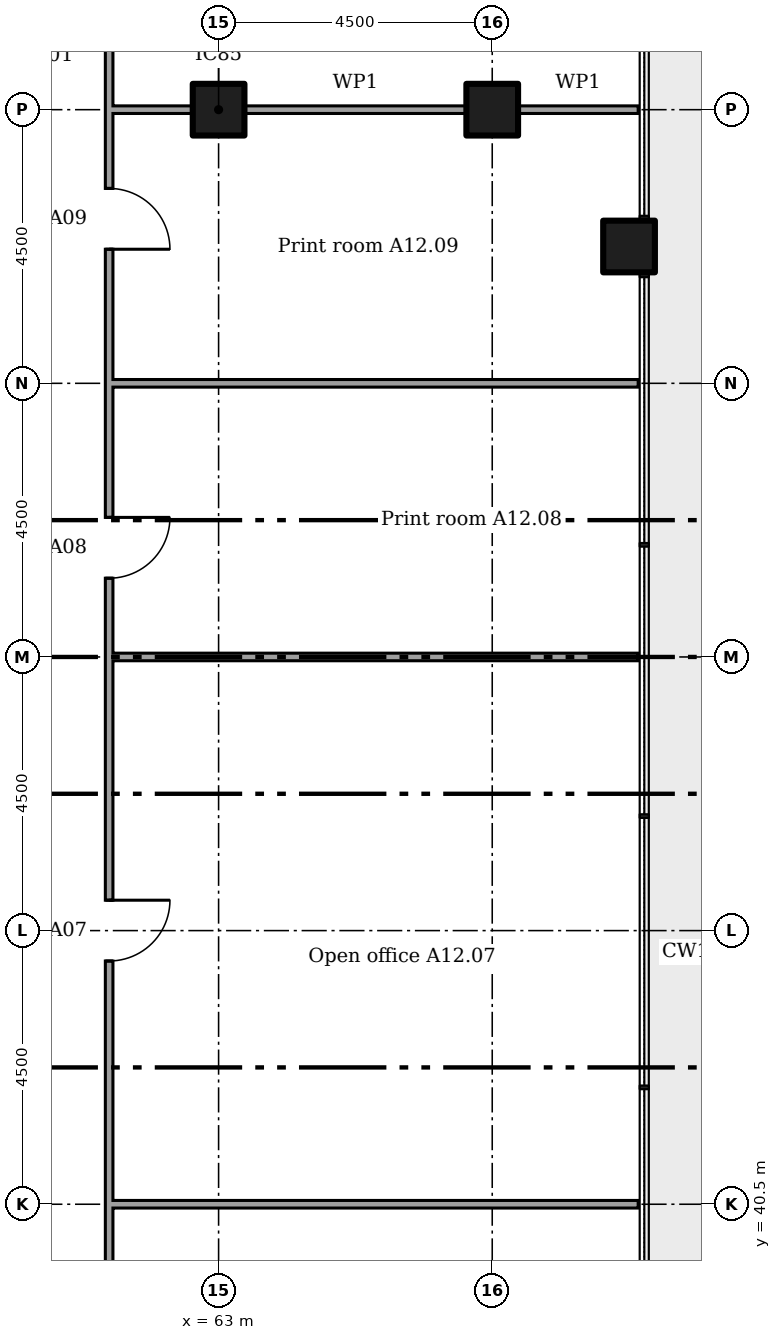
"""IFC4 building model, lengths in metres.
Left out: names, types, materials, properties, quantities, classifications, styles, units other than length and angle.
Written with IfcOpenShell. Run it as: python <this file> out.ifc"""

import sys

from ifc_helpers import new_model, si_unit, direction, frame, frame_2d, origin, origin_2d, place, context, subcontext, project, spatial, rectangle, extrude, element, fill, save


model = new_model("IFC4")
c1 = context("Model", 3, precision=1e-05, world=origin(), true_north=direction((0.0, 1.0)))
c2 = subcontext(c1, "Body", "Model", "MODEL_VIEW")
j1 = project(units=[si_unit("LENGTHUNIT", "METRE"), si_unit("PLANEANGLEUNIT", "RADIAN")], contexts=[c1])
p1 = place(None, origin())
s1 = spatial("IfcSite", under=j1, at=p1, CompositionType="ELEMENT")
p2 = place(p1, origin())
s2 = spatial("IfcBuilding", under=s1, at=p2, CompositionType="ELEMENT")
p3 = place(p2, frame((0.0, 0.0, 54.6)))
s3 = spatial("IfcBuildingStorey", under=s2, at=p3, CompositionType="ELEMENT", Elevation=54.6)
for number, where in (
    (1, (63.0, 58.5, 0.0)),
    (2, (67.5, 58.5, 0.0)),
    (3, (69.75, 56.25, 0.0)),
):
    element("IfcColumn", number, at=place(p3, frame(where)), inside=s3, PredefinedType="COLUMN", context=c2, shape_type="SweptSolid", body=[
        extrude(rectangle(XDim=0.85, YDim=0.85, at=origin_2d()), origin(), (0.0, 0.0, 1.0), 3.6),
    ])
for number, where in (
    (4, (61.2, 40.5, 0.0)),
    (5, (61.2, 49.5, 0.0)),
    (6, (61.2, 54.0, 0.0)),
):
    element("IfcWall", number, at=place(p3, frame(where)), inside=s3, PredefinedType="PARTITIONING", context=c2, shape_type="SweptSolid", body=[
        extrude(rectangle(XDim=8.7, YDim=0.125, at=frame_2d((4.35, 0.0))), origin(), (0.0, 0.0, 1.0), 2.766),
    ])
p4 = place(p3, frame((61.2, 58.5, 0.0)))
e7 = element("IfcWall", 7, at=p4, inside=s3, PredefinedType="PARTITIONING", context=c2, shape_type="SweptSolid", body=[
    extrude(rectangle(XDim=1.375, YDim=0.125, at=frame_2d((0.688, 0.0))), origin(), (0.0, 0.0, 1.0), 2.676),
])
p5 = place(p3, frame((63.425, 58.5, 0.0)))
e8 = element("IfcWall", 8, at=p5, inside=s3, PredefinedType="PARTITIONING", context=c2, shape_type="SweptSolid", body=[
    extrude(rectangle(XDim=3.65, YDim=0.125, at=frame_2d((1.825, 0.0))), origin(), (0.0, 0.0, 1.0), 2.676),
])
p6 = place(p3, frame((67.925, 58.5, 0.0)))
e9 = element("IfcWall", 9, at=p6, inside=s3, PredefinedType="PARTITIONING", context=c2, shape_type="SweptSolid", body=[
    extrude(rectangle(XDim=1.975, YDim=0.125, at=frame_2d((0.987, 0.0))), origin(), (0.0, 0.0, 1.0), 2.676),
])
p7 = place(p3, frame((61.2, 38.462, 0.0), z_axis=(0.0, 0.0, 1.0), x_axis=(0.0, 1.0, 0.0)))
e10 = element("IfcWall", 10, at=p7, inside=s3, PredefinedType="PARTITIONING", context=c2, shape_type="SweptSolid", body=[
    extrude(rectangle(XDim=22.075, YDim=0.125, at=frame_2d((11.038, 0.0))), origin(), (0.0, 0.0, 1.0), 3.45),
])
p8 = place(p7, frame((6.038, 0.0, 0.0)))
e11 = element("IfcOpeningElement", 11, at=p8, cuts=e10, PredefinedType="OPENING", context=c2, shape_type="SweptSolid", body=[
    extrude(rectangle(XDim=1.0, YDim=2.1, at=frame_2d((0.5, 1.05))), frame((0.0, 0.073, 0.0), z_axis=(0.0, -1.0, 0.0), x_axis=(1.0, 0.0, 0.0)), (0.0, 0.0, 1.0), 0.145),
])
p9 = place(p7, frame((12.333, 0.0, 0.0)))
e12 = element("IfcOpeningElement", 12, at=p9, cuts=e10, PredefinedType="OPENING", context=c2, shape_type="SweptSolid", body=[
    extrude(rectangle(XDim=1.0, YDim=2.1, at=frame_2d((0.5, 1.05))), frame((0.0, 0.073, 0.0), z_axis=(0.0, -1.0, 0.0), x_axis=(1.0, 0.0, 0.0)), (0.0, 0.0, 1.0), 0.145),
])
p10 = place(p7, frame((17.742, 0.0, 0.0)))
e13 = element("IfcOpeningElement", 13, at=p10, cuts=e10, PredefinedType="OPENING", context=c2, shape_type="SweptSolid", body=[
    extrude(rectangle(XDim=1.0, YDim=2.1, at=frame_2d((0.5, 1.05))), frame((0.0, 0.073, 0.0), z_axis=(0.0, -1.0, 0.0), x_axis=(1.0, 0.0, 0.0)), (0.0, 0.0, 1.0), 0.145),
])
p11 = place(p8, frame((1.0, 0.0, 0.0), x_axis=(-1.0, 0.0, 0.0)))
e14 = element("IfcDoor", 14, at=p11, inside=s3, OperationType="SINGLE_SWING_RIGHT", PredefinedType="DOOR", context=c2, shape_type="SweptSolid", body=[
    extrude(rectangle(XDim=1.0, YDim=2.1, at=frame_2d((0.5, 1.05))), frame((0.0, 0.025, 0.0), z_axis=(0.0, -1.0, 0.0), x_axis=(1.0, 0.0, 0.0)), (0.0, 0.0, 1.0), 0.05),
])
fill(e11, e14)
p12 = place(p9, frame((1.0, 0.0, 0.0), x_axis=(-1.0, 0.0, 0.0)))
e15 = element("IfcDoor", 15, at=p12, inside=s3, OperationType="SINGLE_SWING_RIGHT", PredefinedType="DOOR", context=c2, shape_type="SweptSolid", body=[
    extrude(rectangle(XDim=1.0, YDim=2.1, at=frame_2d((0.5, 1.05))), frame((0.0, 0.025, 0.0), z_axis=(0.0, -1.0, 0.0), x_axis=(1.0, 0.0, 0.0)), (0.0, 0.0, 1.0), 0.05),
])
fill(e12, e15)
p13 = place(p10, frame((1.0, 0.0, 0.0), x_axis=(-1.0, 0.0, 0.0)))
e16 = element("IfcDoor", 16, at=p13, inside=s3, OperationType="SINGLE_SWING_LEFT", PredefinedType="DOOR", context=c2, shape_type="SweptSolid", body=[
    extrude(rectangle(XDim=1.0, YDim=2.1, at=frame_2d((0.5, 1.05))), frame((0.0, 0.025, 0.0), z_axis=(0.0, -1.0, 0.0), x_axis=(1.0, 0.0, 0.0)), (0.0, 0.0, 1.0), 0.05),
])
fill(e13, e16)
save(model, sys.argv[1])
